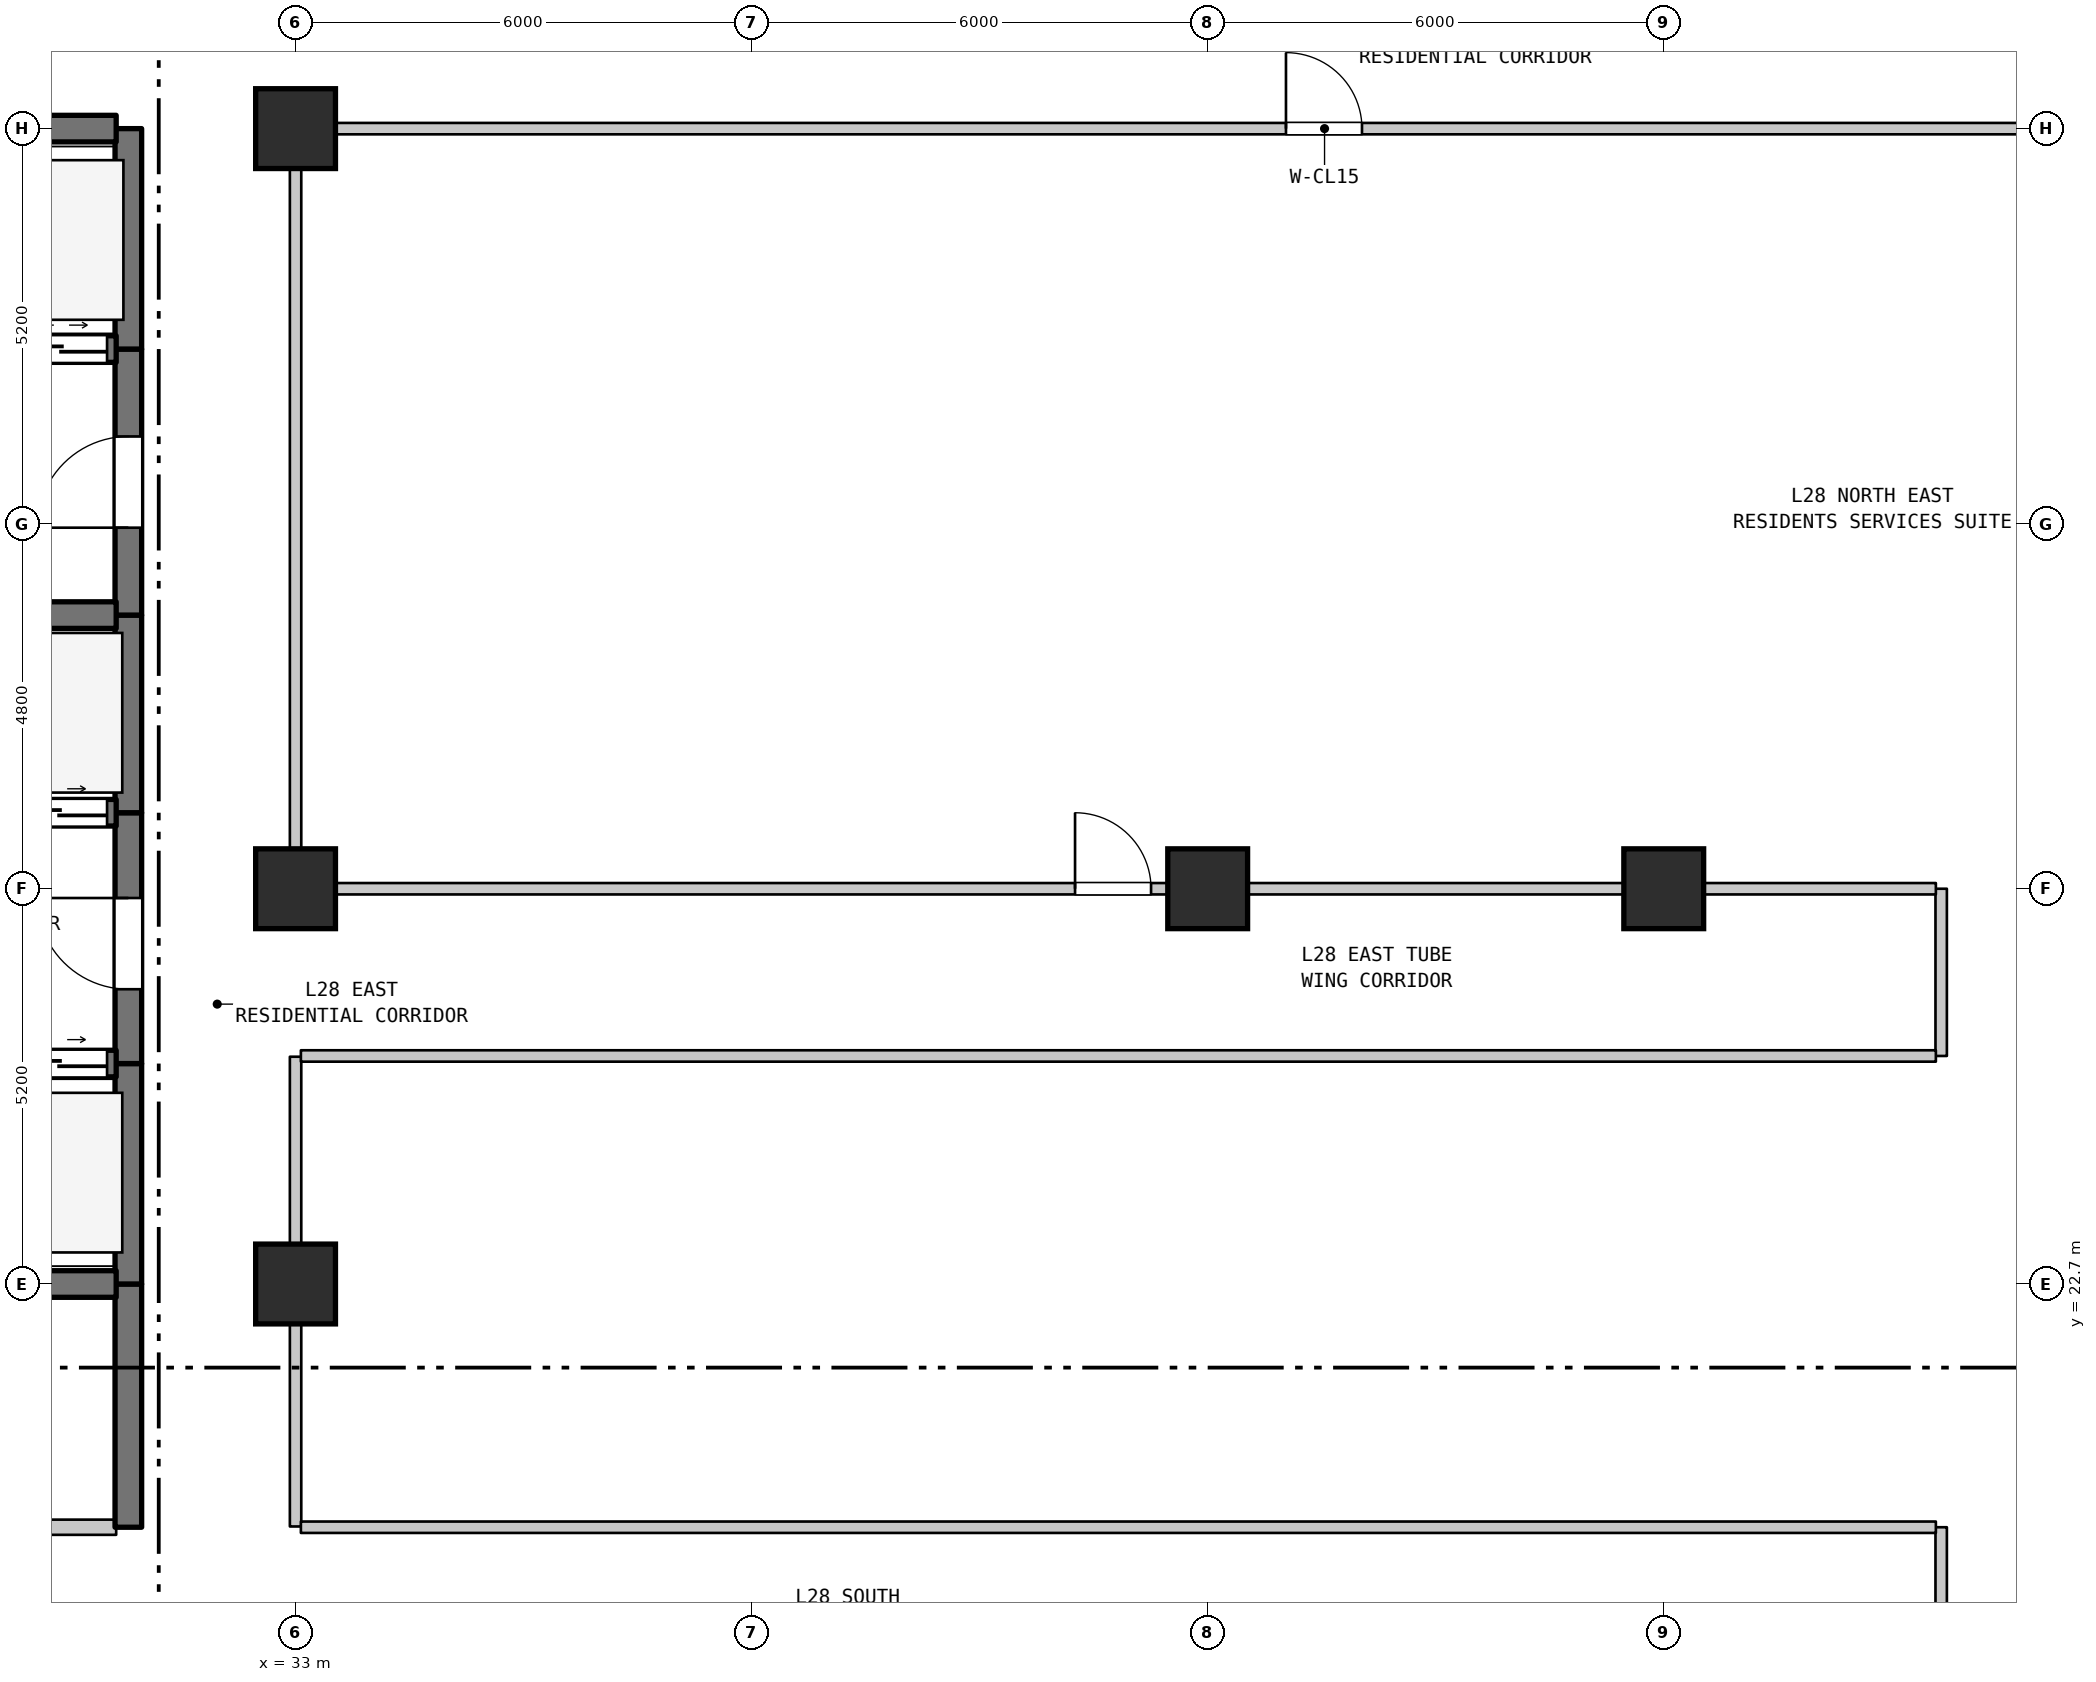
"""IFC4 building model, lengths in metres.
Left out: names, types, materials, properties, quantities, classifications, styles, units other than length and angle.
Written with IfcOpenShell. Run it as: python <this file> out.ifc"""

import sys

from ifc_helpers import new_model, si_unit, direction, frame, frame_2d, origin, origin_2d, place, context, subcontext, project, spatial, rectangle, extrude, element, fill, save


model = new_model("IFC4")
c1 = context("Model", 3, precision=1e-05, world=origin(), true_north=direction((0.0, 1.0)))
c2 = subcontext(c1, "Body", "Model", "MODEL_VIEW")
j1 = project(units=[si_unit("LENGTHUNIT", "METRE"), si_unit("PLANEANGLEUNIT", "RADIAN")], contexts=[c1])
p1 = place(None, origin())
s1 = spatial("IfcSite", under=j1, at=p1, CompositionType="ELEMENT")
p2 = place(p1, origin())
s2 = spatial("IfcBuilding", under=s1, at=p2, CompositionType="ELEMENT")
p3 = place(p2, frame((0.0, 0.0, 116.8)))
s3 = spatial("IfcBuildingStorey", under=s2, at=p3, CompositionType="ELEMENT", Elevation=116.8)
for number, where, z_axis, x_axis in (
    (1, (33.0, 22.7, 0.0), (0.0, 0.0, 1.0), (1.0, 0.0, 0.0)),
    (2, (33.0, 27.9, 0.0), (0.0, 0.0, 1.0), (1.0, 0.0, 0.0)),
    (3, (33.0, 37.9, 0.0), (0.0, 0.0, 1.0), (1.0, 0.0, 0.0)),
    (4, (45.0, 27.9, 0.0), (0.0, 0.0, 1.0), (1.0, 0.0, 0.0)),
    (5, (51.0, 27.9, 0.0), (0.0, 0.0, 1.0), (1.0, 0.0, 0.0)),
):
    element("IfcColumn", number, at=place(p3, frame(where, z_axis=z_axis, x_axis=x_axis)), inside=s3, PredefinedType="COLUMN", context=c2, shape_type="SweptSolid", body=[
        extrude(rectangle(XDim=1.05, YDim=1.05, at=origin_2d()), origin(), (0.0, 0.0, 1.0), 3.7),
    ])
p4 = place(p3, frame((30.8, 19.5, 0.0), z_axis=(0.0, 0.0, 1.0), x_axis=(0.0, 1.0, 0.0)))
e6 = element("IfcWall", 6, at=p4, inside=s3, PredefinedType="SHEAR", context=c2, shape_type="SweptSolid", body=[
    extrude(rectangle(XDim=3.2, YDim=0.35, at=frame_2d((1.6, 0.0))), origin(), (0.0, 0.0, 1.0), 3.38),
])
p5 = place(p3, frame((30.8, 22.7, 0.0), z_axis=(0.0, 0.0, 1.0), x_axis=(0.0, 1.0, 0.0)))
e7 = element("IfcWall", 7, at=p5, inside=s3, PredefinedType="SHEAR", context=c2, shape_type="SweptSolid", body=[
    extrude(rectangle(XDim=2.9, YDim=0.35, at=frame_2d((1.45, 0.0))), origin(), (0.0, 0.0, 1.0), 3.38),
])
p6 = place(p3, frame((30.8, 25.6, 0.0), z_axis=(0.0, 0.0, 1.0), x_axis=(0.0, 1.0, 0.0)))
e8 = element("IfcWall", 8, at=p6, inside=s3, PredefinedType="SHEAR", context=c2, shape_type="SweptSolid", body=[
    extrude(rectangle(XDim=3.3, YDim=0.35, at=frame_2d((1.65, 0.0))), origin(), (0.0, 0.0, 1.0), 3.38),
])
p7 = place(p6, frame((0.978, 0.0, 0.0)))
e9 = element("IfcOpeningElement", 9, at=p7, cuts=e8, PredefinedType="OPENING", context=c2, shape_type="SweptSolid", body=[
    extrude(rectangle(XDim=1.2, YDim=2.2, at=frame_2d((0.6, 1.1))), frame((0.0, 0.185, 0.0), z_axis=(0.0, -1.0, 0.0), x_axis=(1.0, 0.0, 0.0)), (0.0, 0.0, 1.0), 0.37),
])
p8 = place(p3, frame((30.8, 28.9, 0.0), z_axis=(0.0, 0.0, 1.0), x_axis=(0.0, 1.0, 0.0)))
e10 = element("IfcWall", 10, at=p8, inside=s3, PredefinedType="SHEAR", context=c2, shape_type="SweptSolid", body=[
    extrude(rectangle(XDim=2.6, YDim=0.35, at=frame_2d((1.3, 0.0))), origin(), (0.0, 0.0, 1.0), 3.38),
])
p9 = place(p3, frame((30.8, 31.5, 0.0), z_axis=(0.0, 0.0, 1.0), x_axis=(0.0, 1.0, 0.0)))
e11 = element("IfcWall", 11, at=p9, inside=s3, PredefinedType="SHEAR", context=c2, shape_type="SweptSolid", body=[
    extrude(rectangle(XDim=3.5, YDim=0.35, at=frame_2d((1.75, 0.0))), origin(), (0.0, 0.0, 1.0), 3.38),
])
p10 = place(p9, frame((1.15, 0.0, 0.0)))
e12 = element("IfcOpeningElement", 12, at=p10, cuts=e11, PredefinedType="OPENING", context=c2, shape_type="SweptSolid", body=[
    extrude(rectangle(XDim=1.2, YDim=2.2, at=frame_2d((0.6, 1.1))), frame((0.0, 0.185, 0.0), z_axis=(0.0, -1.0, 0.0), x_axis=(1.0, 0.0, 0.0)), (0.0, 0.0, 1.0), 0.37),
])
p11 = place(p3, frame((30.8, 35.0, 0.0), z_axis=(0.0, 0.0, 1.0), x_axis=(0.0, 1.0, 0.0)))
e13 = element("IfcWall", 13, at=p11, inside=s3, PredefinedType="SHEAR", context=c2, shape_type="SweptSolid", body=[
    extrude(rectangle(XDim=2.9, YDim=0.35, at=frame_2d((1.45, 0.0))), origin(), (0.0, 0.0, 1.0), 3.38),
])
p12 = place(p3, frame((33.0, 19.51, 0.0), z_axis=(0.0, 0.0, 1.0), x_axis=(0.0, 1.0, 0.0)))
e14 = element("IfcWall", 14, at=p12, inside=s3, PredefinedType="STANDARD", context=c2, shape_type="SweptSolid", body=[
    extrude(rectangle(XDim=6.18, YDim=0.15, at=frame_2d((3.09, 0.0))), origin(), (0.0, 0.0, 1.0), 2.93),
])
p13 = place(p3, frame((33.0, 27.91, 0.0), z_axis=(0.0, 0.0, 1.0), x_axis=(0.0, 1.0, 0.0)))
e15 = element("IfcWall", 15, at=p13, inside=s3, PredefinedType="STANDARD", context=c2, shape_type="SweptSolid", body=[
    extrude(rectangle(XDim=9.98, YDim=0.15, at=frame_2d((4.99, 0.0))), origin(), (0.0, 0.0, 1.0), 2.88),
])
p14 = place(p3, frame((54.65, 17.31, 0.0), z_axis=(0.0, 0.0, 1.0), x_axis=(0.0, 1.0, 0.0)))
e16 = element("IfcWall", 16, at=p14, inside=s3, PredefinedType="STANDARD", context=c2, shape_type="SweptSolid", body=[
    extrude(rectangle(XDim=2.19, YDim=0.15, at=frame_2d((1.095, 0.0))), origin(), (0.0, 0.0, 1.0), 3.38),
])
p15 = place(p3, frame((54.65, 25.7, 0.0), z_axis=(0.0, 0.0, 1.0), x_axis=(0.0, 1.0, 0.0)))
e17 = element("IfcWall", 17, at=p15, inside=s3, PredefinedType="STANDARD", context=c2, shape_type="SweptSolid", body=[
    extrude(rectangle(XDim=2.2, YDim=0.15, at=frame_2d((1.1, 0.0))), origin(), (0.0, 0.0, 1.0), 3.38),
])
p16 = place(p3, frame((25.985, 19.5, 0.0), z_axis=(0.0, 0.0, 1.0), x_axis=(1.0, 0.0, 0.0)))
e18 = element("IfcWall", 18, at=p16, inside=s3, PredefinedType="STANDARD", context=c2, shape_type="SweptSolid", body=[
    extrude(rectangle(XDim=4.655, YDim=0.2, at=frame_2d((2.327, 0.0))), origin(), (0.0, 0.0, 1.0), 3.38),
])
p17 = place(p16, frame((1.845, 0.0, 0.0)))
e19 = element("IfcOpeningElement", 19, at=p17, cuts=e18, PredefinedType="OPENING", context=c2, shape_type="SweptSolid", body=[
    extrude(rectangle(XDim=0.9, YDim=2.15, at=frame_2d((0.45, 1.075))), frame((0.0, 0.11, 0.0), z_axis=(0.0, -1.0, 0.0), x_axis=(1.0, 0.0, 0.0)), (0.0, 0.0, 1.0), 0.22),
])
p18 = place(p3, frame((33.07, 19.5, 0.0), z_axis=(0.0, 0.0, 1.0), x_axis=(1.0, 0.0, 0.0)))
e20 = element("IfcWall", 20, at=p18, inside=s3, PredefinedType="STANDARD", context=c2, shape_type="SweptSolid", body=[
    extrude(rectangle(XDim=21.51, YDim=0.15, at=frame_2d((10.755, 0.0))), origin(), (0.0, 0.0, 1.0), 3.38),
])
p19 = place(p3, frame((27.46, 22.7, 0.0), z_axis=(0.0, 0.0, 1.0), x_axis=(1.0, 0.0, 0.0)))
e21 = element("IfcWall", 21, at=p19, inside=s3, PredefinedType="SHEAR", context=c2, shape_type="SweptSolid", body=[
    extrude(rectangle(XDim=3.18, YDim=0.35, at=frame_2d((1.59, 0.0))), origin(), (0.0, 0.0, 1.0), 3.38),
])
p20 = place(p3, frame((27.46, 25.6, 0.0), z_axis=(0.0, 0.0, 1.0), x_axis=(1.0, 0.0, 0.0)))
e22 = element("IfcWall", 22, at=p20, inside=s3, PredefinedType="SHEAR", context=c2, shape_type="SweptSolid", body=[
    extrude(rectangle(XDim=3.18, YDim=0.35, at=frame_2d((1.59, 0.0))), origin(), (0.0, 0.0, 1.0), 3.38),
])
p21 = place(p20, frame((0.12, 0.0, 0.0)))
e23 = element("IfcOpeningElement", 23, at=p21, cuts=e22, PredefinedType="OPENING", context=c2, shape_type="SweptSolid", body=[
    extrude(rectangle(XDim=1.25, YDim=2.2, at=frame_2d((0.625, 1.1))), frame((0.0, 0.185, 0.0), z_axis=(0.0, -1.0, 0.0), x_axis=(1.0, 0.0, 0.0)), (0.0, 0.0, 1.0), 0.37),
])
p22 = place(p20, frame((1.81, 0.0, 0.0)))
e24 = element("IfcOpeningElement", 24, at=p22, cuts=e22, PredefinedType="OPENING", context=c2, shape_type="SweptSolid", body=[
    extrude(rectangle(XDim=1.25, YDim=2.2, at=frame_2d((0.625, 1.1))), frame((0.0, 0.185, 0.0), z_axis=(0.0, -1.0, 0.0), x_axis=(1.0, 0.0, 0.0)), (0.0, 0.0, 1.0), 0.37),
])
p23 = place(p3, frame((33.07, 25.7, 0.0), z_axis=(0.0, 0.0, 1.0), x_axis=(1.0, 0.0, 0.0)))
e25 = element("IfcWall", 25, at=p23, inside=s3, PredefinedType="STANDARD", context=c2, shape_type="SweptSolid", body=[
    extrude(rectangle(XDim=21.51, YDim=0.15, at=frame_2d((10.755, 0.0))), origin(), (0.0, 0.0, 1.0), 3.38),
])
p24 = place(p3, frame((33.07, 27.9, 0.0), z_axis=(0.0, 0.0, 1.0), x_axis=(1.0, 0.0, 0.0)))
e26 = element("IfcWall", 26, at=p24, inside=s3, PredefinedType="STANDARD", context=c2, shape_type="SweptSolid", body=[
    extrude(rectangle(XDim=11.93, YDim=0.15, at=frame_2d((5.965, 0.0))), origin(), (0.0, 0.0, 1.0), 2.88),
])
p25 = place(p24, frame((10.185, 0.0, 0.0)))
e27 = element("IfcOpeningElement", 27, at=p25, cuts=e26, PredefinedType="OPENING", context=c2, shape_type="SweptSolid", body=[
    extrude(rectangle(XDim=1.0, YDim=2.15, at=frame_2d((0.5, 1.075))), frame((0.0, 0.085, 0.0), z_axis=(0.0, -1.0, 0.0), x_axis=(1.0, 0.0, 0.0)), (0.0, 0.0, 1.0), 0.17),
])
p26 = place(p3, frame((27.46, 28.9, 0.0), z_axis=(0.0, 0.0, 1.0), x_axis=(1.0, 0.0, 0.0)))
e28 = element("IfcWall", 28, at=p26, inside=s3, PredefinedType="SHEAR", context=c2, shape_type="SweptSolid", body=[
    extrude(rectangle(XDim=3.18, YDim=0.35, at=frame_2d((1.59, 0.0))), origin(), (0.0, 0.0, 1.0), 3.38),
])
p27 = place(p26, frame((0.12, 0.0, 0.0)))
e29 = element("IfcOpeningElement", 29, at=p27, cuts=e28, PredefinedType="OPENING", context=c2, shape_type="SweptSolid", body=[
    extrude(rectangle(XDim=1.25, YDim=2.2, at=frame_2d((0.625, 1.1))), frame((0.0, 0.185, 0.0), z_axis=(0.0, -1.0, 0.0), x_axis=(1.0, 0.0, 0.0)), (0.0, 0.0, 1.0), 0.37),
])
p28 = place(p26, frame((1.81, 0.0, 0.0)))
e30 = element("IfcOpeningElement", 30, at=p28, cuts=e28, PredefinedType="OPENING", context=c2, shape_type="SweptSolid", body=[
    extrude(rectangle(XDim=1.25, YDim=2.2, at=frame_2d((0.625, 1.1))), frame((0.0, 0.185, 0.0), z_axis=(0.0, -1.0, 0.0), x_axis=(1.0, 0.0, 0.0)), (0.0, 0.0, 1.0), 0.37),
])
p29 = place(p3, frame((27.46, 31.5, 0.0), z_axis=(0.0, 0.0, 1.0), x_axis=(1.0, 0.0, 0.0)))
e31 = element("IfcWall", 31, at=p29, inside=s3, PredefinedType="SHEAR", context=c2, shape_type="SweptSolid", body=[
    extrude(rectangle(XDim=3.18, YDim=0.35, at=frame_2d((1.59, 0.0))), origin(), (0.0, 0.0, 1.0), 3.38),
])
p30 = place(p3, frame((19.16, 35.0, 0.0), z_axis=(0.0, 0.0, 1.0), x_axis=(1.0, 0.0, 0.0)))
e32 = element("IfcWall", 32, at=p30, inside=s3, PredefinedType="SHEAR", context=c2, shape_type="SweptSolid", body=[
    extrude(rectangle(XDim=11.48, YDim=0.35, at=frame_2d((5.74, 0.0))), origin(), (0.0, 0.0, 1.0), 3.38),
])
p31 = place(p30, frame((0.365, 0.0, 0.0)))
e33 = element("IfcOpeningElement", 33, at=p31, cuts=e32, PredefinedType="OPENING", context=c2, shape_type="SweptSolid", body=[
    extrude(rectangle(XDim=1.35, YDim=2.2, at=frame_2d((0.675, 1.1))), frame((0.0, 0.185, 0.0), z_axis=(0.0, -1.0, 0.0), x_axis=(1.0, 0.0, 0.0)), (0.0, 0.0, 1.0), 0.37),
])
p32 = place(p30, frame((2.765, 0.0, 0.0)))
e34 = element("IfcOpeningElement", 34, at=p32, cuts=e32, PredefinedType="OPENING", context=c2, shape_type="SweptSolid", body=[
    extrude(rectangle(XDim=1.35, YDim=2.2, at=frame_2d((0.675, 1.1))), frame((0.0, 0.185, 0.0), z_axis=(0.0, -1.0, 0.0), x_axis=(1.0, 0.0, 0.0)), (0.0, 0.0, 1.0), 0.37),
])
p33 = place(p30, frame((4.915, 0.0, 0.0)))
e35 = element("IfcOpeningElement", 35, at=p33, cuts=e32, PredefinedType="OPENING", context=c2, shape_type="SweptSolid", body=[
    extrude(rectangle(XDim=1.2, YDim=2.2, at=frame_2d((0.6, 1.1))), frame((0.0, 0.185, 0.0), z_axis=(0.0, -1.0, 0.0), x_axis=(1.0, 0.0, 0.0)), (0.0, 0.0, 1.0), 0.37),
])
p34 = place(p30, frame((6.665, 0.0, 0.0)))
e36 = element("IfcOpeningElement", 36, at=p34, cuts=e32, PredefinedType="OPENING", context=c2, shape_type="SweptSolid", body=[
    extrude(rectangle(XDim=1.2, YDim=2.2, at=frame_2d((0.6, 1.1))), frame((0.0, 0.185, 0.0), z_axis=(0.0, -1.0, 0.0), x_axis=(1.0, 0.0, 0.0)), (0.0, 0.0, 1.0), 0.37),
])
p35 = place(p30, frame((8.415, 0.0, 0.0)))
e37 = element("IfcOpeningElement", 37, at=p35, cuts=e32, PredefinedType="OPENING", context=c2, shape_type="SweptSolid", body=[
    extrude(rectangle(XDim=1.2, YDim=2.2, at=frame_2d((0.6, 1.1))), frame((0.0, 0.185, 0.0), z_axis=(0.0, -1.0, 0.0), x_axis=(1.0, 0.0, 0.0)), (0.0, 0.0, 1.0), 0.37),
])
p36 = place(p30, frame((10.16, 0.0, 0.0)))
e38 = element("IfcOpeningElement", 38, at=p36, cuts=e32, PredefinedType="OPENING", context=c2, shape_type="SweptSolid", body=[
    extrude(rectangle(XDim=1.2, YDim=2.2, at=frame_2d((0.6, 1.1))), frame((0.0, 0.185, 0.0), z_axis=(0.0, -1.0, 0.0), x_axis=(1.0, 0.0, 0.0)), (0.0, 0.0, 1.0), 0.37),
])
p37 = place(p3, frame((19.16, 37.9, 0.0), z_axis=(0.0, 0.0, 1.0), x_axis=(1.0, 0.0, 0.0)))
e39 = element("IfcWall", 39, at=p37, inside=s3, PredefinedType="SHEAR", context=c2, shape_type="SweptSolid", body=[
    extrude(rectangle(XDim=11.48, YDim=0.35, at=frame_2d((5.74, 0.0))), origin(), (0.0, 0.0, 1.0), 3.38),
])
p38 = place(p3, frame((33.07, 37.9, 0.0), z_axis=(0.0, 0.0, 1.0), x_axis=(1.0, 0.0, 0.0)))
e40 = element("IfcWall", 40, at=p38, inside=s3, PredefinedType="STANDARD", context=c2, shape_type="SweptSolid", body=[
    extrude(rectangle(XDim=26.935, YDim=0.15, at=frame_2d((13.467, 0.0))), origin(), (0.0, 0.0, 1.0), 3.38),
])
p39 = place(p38, frame((12.96, 0.0, 0.0)))
e41 = element("IfcOpeningElement", 41, at=p39, cuts=e40, PredefinedType="OPENING", context=c2, shape_type="SweptSolid", body=[
    extrude(rectangle(XDim=1.0, YDim=2.15, at=frame_2d((0.5, 1.075))), frame((0.0, 0.085, 0.0), z_axis=(0.0, -1.0, 0.0), x_axis=(1.0, 0.0, 0.0)), (0.0, 0.0, 1.0), 0.17),
])
p40 = place(p3, frame((45.0, 27.9, 0.0), z_axis=(0.0, 0.0, 1.0), x_axis=(1.0, 0.0, 0.0)))
e42 = element("IfcWall", 42, at=p40, inside=s3, PredefinedType="STANDARD", context=c2, shape_type="SweptSolid", body=[
    extrude(rectangle(XDim=9.58, YDim=0.15, at=frame_2d((4.79, 0.0))), origin(), (0.0, 0.0, 1.0), 2.93),
])
p41 = place(p7, origin())
e43 = element("IfcDoor", 43, at=p41, inside=s3, OperationType="SINGLE_SWING_RIGHT", PredefinedType="DOOR", context=c2, shape_type="SweptSolid", body=[
    extrude(rectangle(XDim=1.2, YDim=2.2, at=frame_2d((0.6, 1.1))), frame((0.0, 0.025, 0.0), z_axis=(0.0, -1.0, 0.0), x_axis=(1.0, 0.0, 0.0)), (0.0, 0.0, 1.0), 0.05),
])
fill(e9, e43)
p42 = place(p10, origin())
e44 = element("IfcDoor", 44, at=p42, inside=s3, OperationType="SINGLE_SWING_LEFT", PredefinedType="DOOR", context=c2, shape_type="SweptSolid", body=[
    extrude(rectangle(XDim=1.2, YDim=2.2, at=frame_2d((0.6, 1.1))), frame((0.0, 0.025, 0.0), z_axis=(0.0, -1.0, 0.0), x_axis=(1.0, 0.0, 0.0)), (0.0, 0.0, 1.0), 0.05),
])
fill(e12, e44)
p43 = place(p22, origin())
e45 = element("IfcDoor", 45, at=p43, inside=s3, OperationType="DOUBLE_DOOR_SLIDING", PredefinedType="DOOR", context=c2, shape_type="SweptSolid", body=[
    extrude(rectangle(XDim=1.25, YDim=2.2, at=frame_2d((0.625, 1.1))), frame((0.0, 0.025, 0.0), z_axis=(0.0, -1.0, 0.0), x_axis=(1.0, 0.0, 0.0)), (0.0, 0.0, 1.0), 0.05),
])
fill(e24, e45)
p44 = place(p25, origin())
e46 = element("IfcDoor", 46, at=p44, inside=s3, OperationType="SINGLE_SWING_LEFT", PredefinedType="DOOR", context=c2, shape_type="SweptSolid", body=[
    extrude(rectangle(XDim=1.0, YDim=2.15, at=frame_2d((0.5, 1.075))), frame((0.0, 0.025, 0.0), z_axis=(0.0, -1.0, 0.0), x_axis=(1.0, 0.0, 0.0)), (0.0, 0.0, 1.0), 0.05),
])
fill(e27, e46)
p45 = place(p28, origin())
e47 = element("IfcDoor", 47, at=p45, inside=s3, OperationType="DOUBLE_DOOR_SLIDING", PredefinedType="DOOR", context=c2, shape_type="SweptSolid", body=[
    extrude(rectangle(XDim=1.25, YDim=2.2, at=frame_2d((0.625, 1.1))), frame((0.0, 0.025, 0.0), z_axis=(0.0, -1.0, 0.0), x_axis=(1.0, 0.0, 0.0)), (0.0, 0.0, 1.0), 0.05),
])
fill(e30, e47)
p46 = place(p36, origin())
e48 = element("IfcDoor", 48, at=p46, inside=s3, OperationType="DOUBLE_DOOR_SLIDING", PredefinedType="DOOR", context=c2, shape_type="SweptSolid", body=[
    extrude(rectangle(XDim=1.2, YDim=2.2, at=frame_2d((0.6, 1.1))), frame((0.0, 0.025, 0.0), z_axis=(0.0, -1.0, 0.0), x_axis=(1.0, 0.0, 0.0)), (0.0, 0.0, 1.0), 0.05),
])
fill(e38, e48)
p47 = place(p39, origin())
e49 = element("IfcDoor", 49, at=p47, inside=s3, OperationType="SINGLE_SWING_LEFT", PredefinedType="DOOR", context=c2, shape_type="SweptSolid", body=[
    extrude(rectangle(XDim=1.0, YDim=2.15, at=frame_2d((0.5, 1.075))), frame((0.0, 0.025, 0.0), z_axis=(0.0, -1.0, 0.0), x_axis=(1.0, 0.0, 0.0)), (0.0, 0.0, 1.0), 0.05),
])
fill(e41, e49)
save(model, sys.argv[1])
